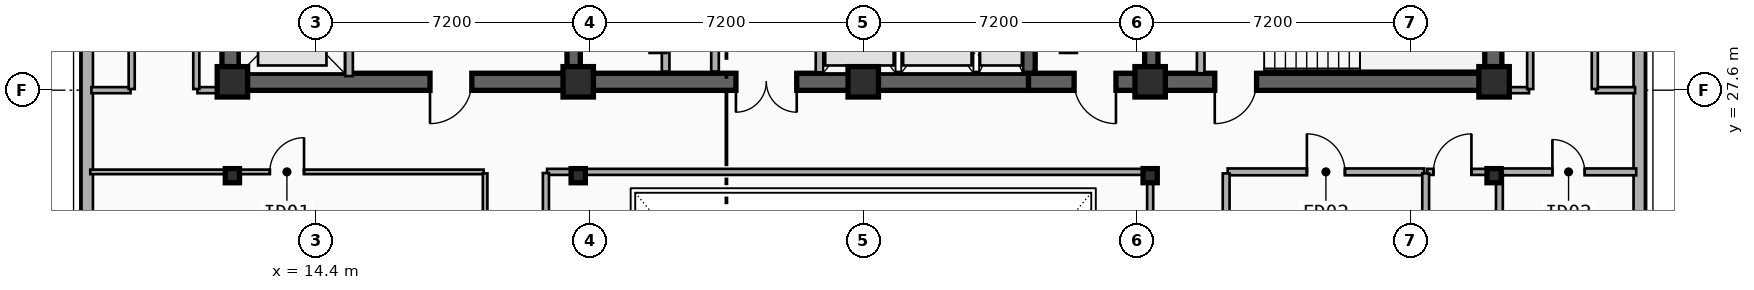
"""IFC4 building model, lengths in metres.
Left out: names, types, materials, properties, quantities, classifications, styles, units other than length and angle.
Written with IfcOpenShell. Run it as: python <this file> out.ifc"""

import sys

from ifc_helpers import new_model, si_unit, direction, frame, frame_2d, origin, origin_2d, place, context, subcontext, project, spatial, rectangle, i_section, extrude, element, fill, save


model = new_model("IFC4")
c1 = context("Model", 3, precision=1e-05, world=origin(), true_north=direction((0.0, 1.0)))
c2 = subcontext(c1, "Body", "Model", "MODEL_VIEW")
j1 = project(units=[si_unit("LENGTHUNIT", "METRE"), si_unit("PLANEANGLEUNIT", "RADIAN")], contexts=[c1])
p1 = place(None, origin())
s1 = spatial("IfcSite", under=j1, at=p1, CompositionType="ELEMENT")
p2 = place(p1, origin())
s2 = spatial("IfcBuilding", under=s1, at=p2, CompositionType="ELEMENT")
p3 = place(p2, frame((0.0, 0.0, 273.2)))
s3 = spatial("IfcBuildingStorey", under=s2, at=p3, CompositionType="ELEMENT", Elevation=273.2)
p4 = place(p3, frame((21.18, 27.82, 0.0), z_axis=(0.0, 0.0, 1.0), x_axis=(-1.0, 0.0, 0.0)))
e1 = element("IfcWall", 1, at=p4, inside=s3, PredefinedType="SHEAR", context=c2, shape_type="SweptSolid", body=[
    extrude(rectangle(XDim=9.03, YDim=0.45, at=frame_2d((4.515, 0.0))), origin(), (0.0, 0.0, 1.0), 3.7),
])
p5 = place(p4, frame((2.68, 0.0, 0.0)))
e2 = element("IfcOpeningElement", 2, at=p5, cuts=e1, PredefinedType="OPENING", context=c2, shape_type="SweptSolid", body=[
    extrude(rectangle(XDim=1.1, YDim=2.15, at=frame_2d((0.55, 1.075))), frame((0.0, 0.235, 0.0), z_axis=(0.0, -1.0, 0.0), x_axis=(1.0, 0.0, 0.0)), (0.0, 0.0, 1.0), 0.47),
])
p6 = place(p3, frame((33.15, 27.82, 0.0), z_axis=(0.0, 0.0, 1.0), x_axis=(-1.0, 0.0, 0.0)))
e3 = element("IfcWall", 3, at=p6, inside=s3, PredefinedType="SHEAR", context=c2, shape_type="SweptSolid", body=[
    extrude(rectangle(XDim=11.97, YDim=0.45, at=frame_2d((5.985, 0.0))), origin(), (0.0, 0.0, 1.0), 3.7),
])
p7 = place(p6, frame((6.1, 0.0, 0.0)))
e4 = element("IfcOpeningElement", 4, at=p7, cuts=e3, PredefinedType="OPENING", context=c2, shape_type="SweptSolid", body=[
    extrude(rectangle(XDim=1.6, YDim=2.2, at=frame_2d((0.8, 1.1))), frame((0.0, 0.235, 0.0), z_axis=(0.0, -1.0, 0.0), x_axis=(1.0, 0.0, 0.0)), (0.0, 0.0, 1.0), 0.47),
])
p8 = place(p3, frame((45.38, 27.82, 0.0), z_axis=(0.0, 0.0, 1.0), x_axis=(-1.0, 0.0, 0.0)))
e5 = element("IfcWall", 5, at=p8, inside=s3, PredefinedType="SHEAR", context=c2, shape_type="SweptSolid", body=[
    extrude(rectangle(XDim=12.23, YDim=0.45, at=frame_2d((6.115, 0.0))), origin(), (0.0, 0.0, 1.0), 3.7),
])
p9 = place(p8, frame((9.93, 0.0, 0.0)))
e6 = element("IfcOpeningElement", 6, at=p9, cuts=e5, PredefinedType="OPENING", context=c2, shape_type="SweptSolid", body=[
    extrude(rectangle(XDim=1.1, YDim=2.15, at=frame_2d((0.55, 1.075))), frame((0.0, 0.235, 0.0), z_axis=(0.0, -1.0, 0.0), x_axis=(1.0, 0.0, 0.0)), (0.0, 0.0, 1.0), 0.47),
])
p10 = place(p8, frame((6.23, 0.0, 0.0)))
e7 = element("IfcOpeningElement", 7, at=p10, cuts=e5, PredefinedType="OPENING", context=c2, shape_type="SweptSolid", body=[
    extrude(rectangle(XDim=1.1, YDim=2.15, at=frame_2d((0.55, 1.075))), frame((0.0, 0.235, 0.0), z_axis=(0.0, -1.0, 0.0), x_axis=(1.0, 0.0, 0.0)), (0.0, 0.0, 1.0), 0.47),
])
for number, where, z_axis, x_axis in (
    (8, (12.15, 28.045, 0.0), (0.0, 0.0, 1.0), (0.0, 1.0, 0.0)),
    (9, (45.38, 28.045, 0.0), (0.0, 0.0, 1.0), (0.0, 1.0, 0.0)),
):
    element("IfcWall", number, at=place(p3, frame(where, z_axis=z_axis, x_axis=x_axis)), inside=s3, PredefinedType="SHEAR", context=c2, shape_type="SweptSolid", body=[
        extrude(rectangle(XDim=8.78, YDim=0.45, at=frame_2d((4.39, 0.0))), origin(), (0.0, 0.0, 1.0), 3.7),
    ])
for number, where, z_axis, x_axis in (
    (10, (21.18, 28.045, 0.0), (0.0, 0.0, 1.0), (0.0, 1.0, 0.0)),
    (11, (33.15, 28.045, 0.0), (0.0, 0.0, 1.0), (0.0, 1.0, 0.0)),
):
    element("IfcWall", number, at=place(p3, frame(where, z_axis=z_axis, x_axis=x_axis)), inside=s3, PredefinedType="SHEAR", context=c2, shape_type="SweptSolid", body=[
        extrude(rectangle(XDim=8.78, YDim=0.35, at=frame_2d((4.39, 0.0))), origin(), (0.0, 0.0, 1.0), 3.7),
    ])
p11 = place(p3, frame((36.38, 28.045, 0.0), z_axis=(0.0, 0.0, 1.0), x_axis=(0.0, 1.0, 0.0)))
e12 = element("IfcWall", 12, at=p11, inside=s3, PredefinedType="SHEAR", context=c2, shape_type="SweptSolid", body=[
    extrude(rectangle(XDim=8.78, YDim=0.35, at=frame_2d((4.39, 0.0))), origin(), (0.0, 0.0, 1.0), 3.7),
])
p12 = place(p11, frame((3.735, 0.0, 0.0)))
e13 = element("IfcOpeningElement", 13, at=p12, cuts=e12, PredefinedType="OPENING", context=c2, shape_type="SweptSolid", body=[
    extrude(rectangle(XDim=1.1, YDim=2.15, at=frame_2d((0.55, 1.075))), frame((0.0, 0.185, 0.0), z_axis=(0.0, -1.0, 0.0), x_axis=(1.0, 0.0, 0.0)), (0.0, 0.0, 1.0), 0.37),
])
for number, where, z_axis, x_axis in (
    (14, (12.2, 27.82, 0.0), (0.0, 0.0, 1.0), (1.0, 0.0, 0.0)),
    (15, (21.3, 27.82, 0.0), (0.0, 0.0, 1.0), (1.0, 0.0, 0.0)),
    (16, (28.8, 27.82, 0.0), (0.0, 0.0, 1.0), (1.0, 0.0, 0.0)),
    (17, (36.35, 27.82, 0.0), (0.0, 0.0, 1.0), (1.0, 0.0, 0.0)),
    (18, (45.4, 27.82, 0.0), (0.0, 0.0, 1.0), (1.0, 0.0, 0.0)),
):
    element("IfcColumn", number, at=place(p3, frame(where, z_axis=z_axis, x_axis=x_axis)), inside=s3, PredefinedType="COLUMN", context=c2, shape_type="SweptSolid", body=[
        extrude(rectangle(XDim=0.8, YDim=0.8, at=origin_2d()), origin(), (0.0, 0.0, 1.0), 3.7),
    ])
for number, where, z_axis, x_axis in (
    (19, (12.2, 25.35, 0.0), (0.0, 0.0, 1.0), (1.0, 0.0, 0.0)),
    (20, (21.3, 25.35, 0.0), (0.0, 0.0, 1.0), (1.0, 0.0, 0.0)),
    (21, (36.35, 25.35, 0.0), (0.0, 0.0, 1.0), (1.0, 0.0, 0.0)),
    (22, (45.4, 25.35, 0.0), (0.0, 0.0, 1.0), (1.0, 0.0, 0.0)),
):
    element("IfcColumn", number, at=place(p3, frame(where, z_axis=z_axis, x_axis=x_axis)), inside=s3, PredefinedType="COLUMN", context=c2, shape_type="SweptSolid", body=[
        extrude(i_section(OverallWidth=0.374, OverallDepth=0.372, WebThickness=0.017, FlangeThickness=0.027, FilletRadius=0.015, at=origin_2d()), origin(), (0.0, 0.0, 1.0), 3.7),
    ])
p13 = place(p3, frame((49.22, 36.8, 0.0), z_axis=(0.0, 0.0, 1.0), x_axis=(0.0, -1.0, 0.0)))
e23 = element("IfcWall", 23, at=p13, inside=s3, PredefinedType="SOLIDWALL", context=c2, shape_type="SweptSolid", body=[
    extrude(rectangle(XDim=34.2, YDim=0.3, at=frame_2d((17.1, 0.0))), origin(), (0.0, 0.0, 1.0), 3.42),
])
p14 = place(p13, frame((21.127, 0.0, 0.75)))
e24 = element("IfcOpeningElement", 24, at=p14, cuts=e23, PredefinedType="OPENING", context=c2, shape_type="SweptSolid", body=[
    extrude(rectangle(XDim=2.1, YDim=2.1, at=frame_2d((1.05, 1.05))), frame((0.0, 0.16, 0.0), z_axis=(0.0, -1.0, 0.0), x_axis=(1.0, 0.0, 0.0)), (0.0, 0.0, 1.0), 0.32),
])
p15 = place(p13, frame((27.503, 0.0, 0.75)))
e25 = element("IfcOpeningElement", 25, at=p15, cuts=e23, PredefinedType="OPENING", context=c2, shape_type="SweptSolid", body=[
    extrude(rectangle(XDim=2.1, YDim=2.1, at=frame_2d((1.05, 1.05))), frame((0.0, 0.16, 0.0), z_axis=(0.0, -1.0, 0.0), x_axis=(1.0, 0.0, 0.0)), (0.0, 0.0, 1.0), 0.32),
])
p16 = place(p3, frame((8.38, 2.6, 0.0), z_axis=(0.0, 0.0, 1.0), x_axis=(0.0, 1.0, 0.0)))
e26 = element("IfcWall", 26, at=p16, inside=s3, PredefinedType="SOLIDWALL", context=c2, shape_type="SweptSolid", body=[
    extrude(rectangle(XDim=34.2, YDim=0.3, at=frame_2d((17.1, 0.0))), origin(), (0.0, 0.0, 1.0), 3.42),
])
p17 = place(p16, frame((6.33, 0.0, 0.75)))
e27 = element("IfcOpeningElement", 27, at=p17, cuts=e26, PredefinedType="OPENING", context=c2, shape_type="SweptSolid", body=[
    extrude(rectangle(XDim=2.1, YDim=2.1, at=frame_2d((1.05, 1.05))), frame((0.0, 0.16, 0.0), z_axis=(0.0, -1.0, 0.0), x_axis=(1.0, 0.0, 0.0)), (0.0, 0.0, 1.0), 0.32),
])
p18 = place(p16, frame((14.44, 0.0, 0.75)))
e28 = element("IfcOpeningElement", 28, at=p18, cuts=e26, PredefinedType="OPENING", context=c2, shape_type="SweptSolid", body=[
    extrude(rectangle(XDim=2.1, YDim=2.1, at=frame_2d((1.05, 1.05))), frame((0.0, 0.16, 0.0), z_axis=(0.0, -1.0, 0.0), x_axis=(1.0, 0.0, 0.0)), (0.0, 0.0, 1.0), 0.32),
])
p19 = place(p3, frame((15.27, 27.97, 0.0), z_axis=(0.0, 0.0, 1.0), x_axis=(0.0, 1.0, 0.0)))
e29 = element("IfcWall", 29, at=p19, inside=s3, PredefinedType="PARTITIONING", context=c2, shape_type="SweptSolid", body=[
    extrude(rectangle(XDim=2.96, YDim=0.2, at=frame_2d((1.48, 0.0))), origin(), (0.0, 0.0, 1.0), 2.49),
])
p20 = place(p19, frame((0.93, 0.0, 0.0)))
e30 = element("IfcOpeningElement", 30, at=p20, cuts=e29, PredefinedType="OPENING", context=c2, shape_type="SweptSolid", body=[
    extrude(rectangle(XDim=1.1, YDim=2.15, at=frame_2d((0.55, 1.075))), frame((0.0, 0.11, 0.0), z_axis=(0.0, -1.0, 0.0), x_axis=(1.0, 0.0, 0.0)), (0.0, 0.0, 1.0), 0.22),
])
p21 = place(p3, frame((27.65, 28.07, 0.0), z_axis=(0.0, 0.0, 1.0), x_axis=(0.0, 1.0, 0.0)))
e31 = element("IfcWall", 31, at=p21, inside=s3, PredefinedType="PARTITIONING", context=c2, shape_type="SweptSolid", body=[
    extrude(rectangle(XDim=2.58, YDim=0.2, at=frame_2d((1.29, 0.0))), origin(), (0.0, 0.0, 1.0), 2.49),
])
p22 = place(p3, frame((37.68, 28.045, 0.0), z_axis=(0.0, 0.0, 1.0), x_axis=(0.0, 1.0, 0.0)))
e32 = element("IfcWall", 32, at=p22, inside=s3, PredefinedType="PARTITIONING", context=c2, shape_type="SweptSolid", body=[
    extrude(rectangle(XDim=3.205, YDim=0.2, at=frame_2d((1.603, 0.0))), origin(), (0.0, 0.0, 1.0), 2.8),
])
p23 = place(p3, frame((24.9, 30.71, 0.0), z_axis=(0.0, 0.0, 1.0), x_axis=(0.0, -1.0, 0.0)))
e33 = element("IfcWall", 33, at=p23, inside=s3, PredefinedType="PARTITIONING", context=c2, shape_type="SweptSolid", body=[
    extrude(rectangle(XDim=2.62, YDim=0.2, at=frame_2d((1.31, 0.0))), origin(), (0.0, 0.0, 1.0), 2.8),
])
p24 = place(p23, frame((0.282, 0.0, 0.0)))
e34 = element("IfcOpeningElement", 34, at=p24, cuts=e33, PredefinedType="OPENING", context=c2, shape_type="SweptSolid", body=[
    extrude(rectangle(XDim=1.2, YDim=2.15, at=frame_2d((0.6, 1.075))), frame((0.0, 0.11, 0.0), z_axis=(0.0, -1.0, 0.0), x_axis=(1.0, 0.0, 0.0)), (0.0, 0.0, 1.0), 0.22),
])
p25 = place(p3, frame((23.6, 28.09, 0.0), z_axis=(0.0, 0.0, 1.0), x_axis=(0.0, 1.0, 0.0)))
e35 = element("IfcWall", 35, at=p25, inside=s3, PredefinedType="PARTITIONING", context=c2, shape_type="SweptSolid", body=[
    extrude(rectangle(XDim=2.62, YDim=0.2, at=frame_2d((1.31, 0.0))), origin(), (0.0, 0.0, 1.0), 2.8),
])
p26 = place(p3, frame((8.46, 25.45, 0.0), z_axis=(0.0, 0.0, 1.0), x_axis=(1.0, 0.0, 0.0)))
e36 = element("IfcWall", 36, at=p26, inside=s3, PredefinedType="PARTITIONING", context=c2, shape_type="SweptSolid", body=[
    extrude(rectangle(XDim=10.35, YDim=0.12, at=frame_2d((5.175, 0.0))), origin(), (0.0, 0.0, 1.0), 2.7),
])
p27 = place(p26, frame((4.725, 0.0, 0.0)))
e37 = element("IfcOpeningElement", 37, at=p27, cuts=e36, PredefinedType="OPENING", context=c2, shape_type="SweptSolid", body=[
    extrude(rectangle(XDim=0.9, YDim=2.1, at=frame_2d((0.45, 1.05))), frame((0.0, 0.07, 0.0), z_axis=(0.0, -1.0, 0.0), x_axis=(1.0, 0.0, 0.0)), (0.0, 0.0, 1.0), 0.14),
])
p28 = place(p3, frame((38.39, 25.45, 0.0), z_axis=(0.0, 0.0, 1.0), x_axis=(1.0, 0.0, 0.0)))
e38 = element("IfcWall", 38, at=p28, inside=s3, PredefinedType="PLUMBINGWALL", context=c2, shape_type="SweptSolid", body=[
    extrude(rectangle(XDim=5.17, YDim=0.18, at=frame_2d((2.585, 0.0))), origin(), (0.0, 0.0, 1.0), 3.42),
])
p29 = place(p28, frame((2.085, 0.0, 0.0)))
e39 = element("IfcOpeningElement", 39, at=p29, cuts=e38, PredefinedType="OPENING", context=c2, shape_type="SweptSolid", body=[
    extrude(rectangle(XDim=1.0, YDim=2.15, at=frame_2d((0.5, 1.075))), frame((0.0, 0.1, 0.0), z_axis=(0.0, -1.0, 0.0), x_axis=(1.0, 0.0, 0.0)), (0.0, 0.0, 1.0), 0.2),
])
p30 = place(p3, frame((43.64, 25.45, 0.0), z_axis=(0.0, 0.0, 1.0), x_axis=(1.0, 0.0, 0.0)))
e40 = element("IfcWall", 40, at=p30, inside=s3, PredefinedType="PARTITIONING", context=c2, shape_type="SweptSolid", body=[
    extrude(rectangle(XDim=1.86, YDim=0.16, at=frame_2d((0.93, 0.0))), origin(), (0.0, 0.0, 1.0), 2.7),
])
p31 = place(p30, frame((0.164, 0.0, 0.0)))
e41 = element("IfcOpeningElement", 41, at=p31, cuts=e40, PredefinedType="OPENING", context=c2, shape_type="SweptSolid", body=[
    extrude(rectangle(XDim=1.0, YDim=2.15, at=frame_2d((0.5, 1.075))), frame((0.0, 0.09, 0.0), z_axis=(0.0, -1.0, 0.0), x_axis=(1.0, 0.0, 0.0)), (0.0, 0.0, 1.0), 0.18),
])
p32 = place(p3, frame((45.58, 25.45, 0.0), z_axis=(0.0, 0.0, 1.0), x_axis=(1.0, 0.0, 0.0)))
e42 = element("IfcWall", 42, at=p32, inside=s3, PredefinedType="PLUMBINGWALL", context=c2, shape_type="SweptSolid", body=[
    extrude(rectangle(XDim=3.56, YDim=0.18, at=frame_2d((1.78, 0.0))), origin(), (0.0, 0.0, 1.0), 2.7),
])
p33 = place(p32, frame((1.355, 0.0, 0.0)))
e43 = element("IfcOpeningElement", 43, at=p33, cuts=e42, PredefinedType="OPENING", context=c2, shape_type="SweptSolid", body=[
    extrude(rectangle(XDim=0.85, YDim=2.1, at=frame_2d((0.425, 1.05))), frame((0.0, 0.1, 0.0), z_axis=(0.0, -1.0, 0.0), x_axis=(1.0, 0.0, 0.0)), (0.0, 0.0, 1.0), 0.2),
])
p34 = place(p3, frame((18.85, 8.89, 0.0), z_axis=(0.0, 0.0, 1.0), x_axis=(0.0, 1.0, 0.0)))
e44 = element("IfcWall", 44, at=p34, inside=s3, PredefinedType="PARTITIONING", context=c2, shape_type="SweptSolid", body=[
    extrude(rectangle(XDim=16.52, YDim=0.12, at=frame_2d((8.26, 0.0))), origin(), (0.0, 0.0, 1.0), 2.85),
])
p35 = place(p34, frame((7.81, 0.0, 0.0)))
e45 = element("IfcOpeningElement", 45, at=p35, cuts=e44, PredefinedType="OPENING", context=c2, shape_type="SweptSolid", body=[
    extrude(rectangle(XDim=0.9, YDim=2.1, at=frame_2d((0.45, 1.05))), frame((0.0, 0.07, 0.0), z_axis=(0.0, -1.0, 0.0), x_axis=(1.0, 0.0, 0.0)), (0.0, 0.0, 1.0), 0.14),
])
p36 = place(p3, frame((38.35, 19.24, 0.0), z_axis=(0.0, 0.0, 1.0), x_axis=(0.0, 1.0, 0.0)))
e46 = element("IfcWall", 46, at=p36, inside=s3, PredefinedType="PLUMBINGWALL", context=c2, shape_type="SweptSolid", body=[
    extrude(rectangle(XDim=6.17, YDim=0.18, at=frame_2d((3.085, 0.0))), origin(), (0.0, 0.0, 1.0), 3.01),
])
p37 = place(p36, frame((2.585, 0.0, 0.0)))
e47 = element("IfcOpeningElement", 47, at=p37, cuts=e46, PredefinedType="OPENING", context=c2, shape_type="SweptSolid", body=[
    extrude(rectangle(XDim=1.0, YDim=2.15, at=frame_2d((0.5, 1.075))), frame((0.0, 0.1, 0.0), z_axis=(0.0, -1.0, 0.0), x_axis=(1.0, 0.0, 0.0)), (0.0, 0.0, 1.0), 0.2),
])
p38 = place(p3, frame((43.6, 19.24, 0.0), z_axis=(0.0, 0.0, 1.0), x_axis=(0.0, 1.0, 0.0)))
e48 = element("IfcWall", 48, at=p38, inside=s3, PredefinedType="PLUMBINGWALL", context=c2, shape_type="SweptSolid", body=[
    extrude(rectangle(XDim=6.17, YDim=0.18, at=frame_2d((3.085, 0.0))), origin(), (0.0, 0.0, 1.0), 3.01),
])
p39 = place(p3, frame((45.54, 20.29, 0.0), z_axis=(0.0, 0.0, 1.0), x_axis=(0.0, 1.0, 0.0)))
e49 = element("IfcWall", 49, at=p39, inside=s3, PredefinedType="PLUMBINGWALL", context=c2, shape_type="SweptSolid", body=[
    extrude(rectangle(XDim=5.12, YDim=0.18, at=frame_2d((2.56, 0.0))), origin(), (0.0, 0.0, 1.0), 2.7),
])
p40 = place(p3, frame((20.48, 25.45, 0.0), z_axis=(0.0, 0.0, 1.0), x_axis=(1.0, 0.0, 0.0)))
e50 = element("IfcWall", 50, at=p40, inside=s3, PredefinedType="PARTITIONING", context=c2, shape_type="SweptSolid", body=[
    extrude(rectangle(XDim=15.84, YDim=0.16, at=frame_2d((7.92, 0.0))), origin(), (0.0, 0.0, 1.0), 2.7),
])
p41 = place(p3, frame((8.49, 27.6, 0.0), z_axis=(0.0, 0.0, 1.0), x_axis=(1.0, 0.0, 0.0)))
e51 = element("IfcWall", 51, at=p41, inside=s3, PredefinedType="PARTITIONING", context=c2, shape_type="SweptSolid", body=[
    extrude(rectangle(XDim=1.03, YDim=0.16, at=frame_2d((0.515, 0.0))), origin(), (0.0, 0.0, 1.0), 3.42),
])
p42 = place(p3, frame((11.28, 27.6, 0.0), z_axis=(0.0, 0.0, 1.0), x_axis=(1.0, 0.0, 0.0)))
e52 = element("IfcWall", 52, at=p42, inside=s3, PredefinedType="PARTITIONING", context=c2, shape_type="SweptSolid", body=[
    extrude(rectangle(XDim=0.84, YDim=0.16, at=frame_2d((0.42, 0.0))), origin(), (0.0, 0.0, 1.0), 2.49),
])
p43 = place(p3, frame((45.41, 27.6, 0.0), z_axis=(0.0, 0.0, 1.0), x_axis=(1.0, 0.0, 0.0)))
e53 = element("IfcWall", 53, at=p43, inside=s3, PredefinedType="PARTITIONING", context=c2, shape_type="SweptSolid", body=[
    extrude(rectangle(XDim=0.91, YDim=0.16, at=frame_2d((0.455, 0.0))), origin(), (0.0, 0.0, 1.0), 2.49),
])
p44 = place(p3, frame((48.08, 27.6, 0.0), z_axis=(0.0, 0.0, 1.0), x_axis=(1.0, 0.0, 0.0)))
e54 = element("IfcWall", 54, at=p44, inside=s3, PredefinedType="PARTITIONING", context=c2, shape_type="SweptSolid", body=[
    extrude(rectangle(XDim=1.03, YDim=0.16, at=frame_2d((0.515, 0.0))), origin(), (0.0, 0.0, 1.0), 3.42),
])
p45 = place(p3, frame((20.45, 10.43, 0.0), z_axis=(0.0, 0.0, 1.0), x_axis=(0.0, 1.0, 0.0)))
e55 = element("IfcWall", 55, at=p45, inside=s3, PredefinedType="PARTITIONING", context=c2, shape_type="SweptSolid", body=[
    extrude(rectangle(XDim=14.99, YDim=0.16, at=frame_2d((7.495, 0.0))), origin(), (0.0, 0.0, 1.0), 2.85),
])
p46 = place(p3, frame((36.35, 10.43, 0.0), z_axis=(0.0, 0.0, 1.0), x_axis=(0.0, 1.0, 0.0)))
e56 = element("IfcWall", 56, at=p46, inside=s3, PredefinedType="PARTITIONING", context=c2, shape_type="SweptSolid", body=[
    extrude(rectangle(XDim=14.99, YDim=0.16, at=frame_2d((7.495, 0.0))), origin(), (0.0, 0.0, 1.0), 2.7),
])
for number, where, z_axis, x_axis in (
    (57, (9.55, 27.63, 0.0), (0.0, 0.0, 1.0), (0.0, 1.0, 0.0)),
    (58, (11.25, 27.63, 0.0), (0.0, 0.0, 1.0), (0.0, 1.0, 0.0)),
    (59, (46.35, 27.63, 0.0), (0.0, 0.0, 1.0), (0.0, 1.0, 0.0)),
    (60, (48.05, 27.63, 0.0), (0.0, 0.0, 1.0), (0.0, 1.0, 0.0)),
):
    element("IfcWall", number, at=place(p3, frame(where, z_axis=z_axis, x_axis=x_axis)), inside=s3, PredefinedType="PARTITIONING", context=c2, shape_type="SweptSolid", body=[
        extrude(rectangle(XDim=10.24, YDim=0.16, at=frame_2d((5.12, 0.0))), origin(), (0.0, 0.0, 1.0), 2.9),
    ])
p47 = place(p5, origin())
e61 = element("IfcDoor", 61, at=p47, inside=s3, OperationType="SINGLE_SWING_RIGHT", PredefinedType="DOOR", context=c2, shape_type="SweptSolid", body=[
    extrude(rectangle(XDim=1.1, YDim=2.15, at=frame_2d((0.55, 1.075))), frame((0.0, 0.025, 0.0), z_axis=(0.0, -1.0, 0.0), x_axis=(1.0, 0.0, 0.0)), (0.0, 0.0, 1.0), 0.05),
])
fill(e2, e61)
p48 = place(p9, origin())
e62 = element("IfcDoor", 62, at=p48, inside=s3, OperationType="SINGLE_SWING_LEFT", PredefinedType="DOOR", context=c2, shape_type="SweptSolid", body=[
    extrude(rectangle(XDim=1.1, YDim=2.15, at=frame_2d((0.55, 1.075))), frame((0.0, 0.025, 0.0), z_axis=(0.0, -1.0, 0.0), x_axis=(1.0, 0.0, 0.0)), (0.0, 0.0, 1.0), 0.05),
])
fill(e6, e62)
p49 = place(p10, origin())
e63 = element("IfcDoor", 63, at=p49, inside=s3, OperationType="SINGLE_SWING_RIGHT", PredefinedType="DOOR", context=c2, shape_type="SweptSolid", body=[
    extrude(rectangle(XDim=1.1, YDim=2.15, at=frame_2d((0.55, 1.075))), frame((0.0, 0.025, 0.0), z_axis=(0.0, -1.0, 0.0), x_axis=(1.0, 0.0, 0.0)), (0.0, 0.0, 1.0), 0.05),
])
fill(e7, e63)
p50 = place(p7, origin())
e64 = element("IfcDoor", 64, at=p50, inside=s3, OperationType="SINGLE_SWING_LEFT", PredefinedType="DOOR", context=c2, shape_type="SweptSolid", body=[
    extrude(rectangle(XDim=1.6, YDim=2.2, at=frame_2d((0.8, 1.1))), frame((0.0, 0.025, 0.0), z_axis=(0.0, -1.0, 0.0), x_axis=(1.0, 0.0, 0.0)), (0.0, 0.0, 1.0), 0.05),
])
fill(e4, e64)
p51 = place(p27, origin())
e65 = element("IfcDoor", 65, at=p51, inside=s3, OperationType="SINGLE_SWING_RIGHT", PredefinedType="DOOR", context=c2, shape_type="SweptSolid", body=[
    extrude(rectangle(XDim=0.9, YDim=2.1, at=frame_2d((0.45, 1.05))), frame((0.0, 0.025, 0.0), z_axis=(0.0, -1.0, 0.0), x_axis=(1.0, 0.0, 0.0)), (0.0, 0.0, 1.0), 0.05),
])
fill(e37, e65)
p52 = place(p29, origin())
e66 = element("IfcDoor", 66, at=p52, inside=s3, OperationType="SINGLE_SWING_LEFT", PredefinedType="DOOR", context=c2, shape_type="SweptSolid", body=[
    extrude(rectangle(XDim=1.0, YDim=2.15, at=frame_2d((0.5, 1.075))), frame((0.0, 0.025, 0.0), z_axis=(0.0, -1.0, 0.0), x_axis=(1.0, 0.0, 0.0)), (0.0, 0.0, 1.0), 0.05),
])
fill(e39, e66)
p53 = place(p31, origin())
e67 = element("IfcDoor", 67, at=p53, inside=s3, OperationType="SINGLE_SWING_RIGHT", PredefinedType="DOOR", context=c2, shape_type="SweptSolid", body=[
    extrude(rectangle(XDim=1.0, YDim=2.15, at=frame_2d((0.5, 1.075))), frame((0.0, 0.025, 0.0), z_axis=(0.0, -1.0, 0.0), x_axis=(1.0, 0.0, 0.0)), (0.0, 0.0, 1.0), 0.05),
])
fill(e41, e67)
p54 = place(p33, origin())
e68 = element("IfcDoor", 68, at=p54, inside=s3, OperationType="SINGLE_SWING_LEFT", PredefinedType="DOOR", context=c2, shape_type="SweptSolid", body=[
    extrude(rectangle(XDim=0.85, YDim=2.1, at=frame_2d((0.425, 1.05))), frame((0.0, 0.025, 0.0), z_axis=(0.0, -1.0, 0.0), x_axis=(1.0, 0.0, 0.0)), (0.0, 0.0, 1.0), 0.05),
])
fill(e43, e68)
save(model, sys.argv[1])
